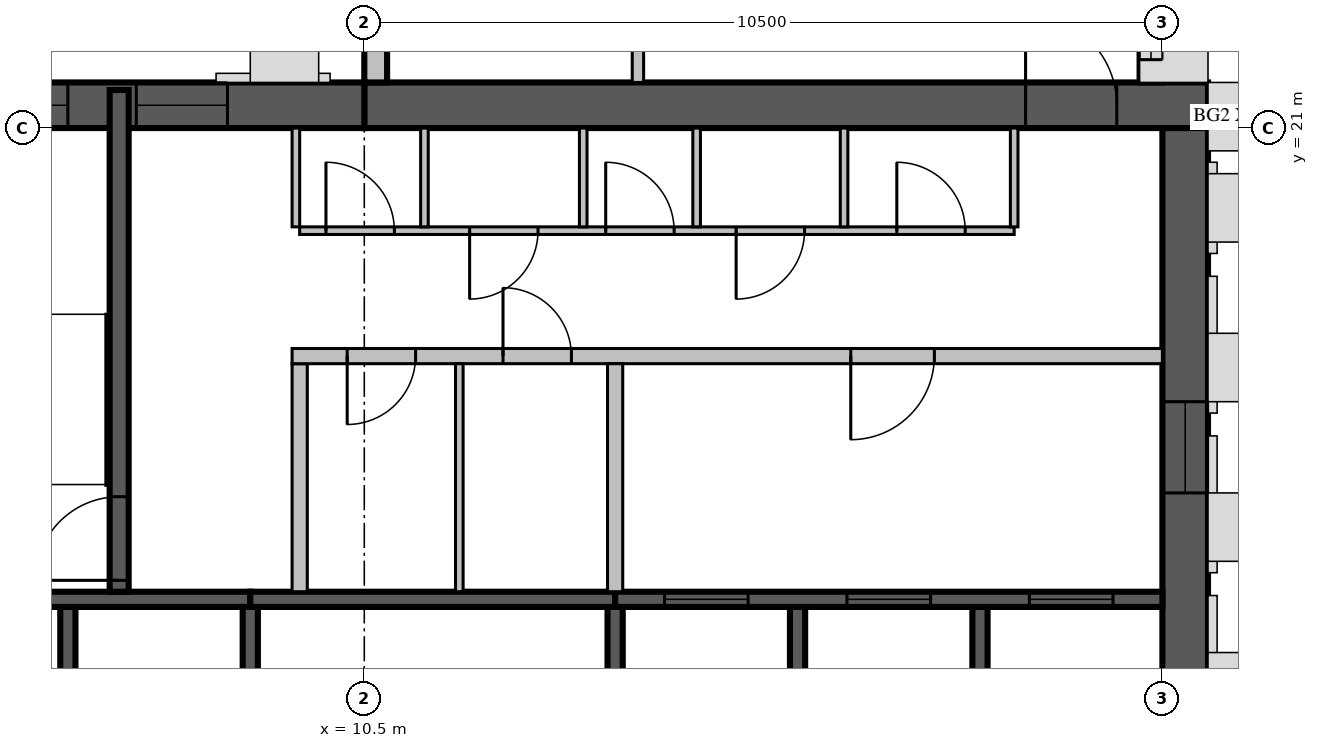
"""IFC4 building model, lengths in metres.
Left out: names, types, materials, properties, quantities, classifications, styles, units other than length and angle.
Written with IfcOpenShell. Run it as: python <this file> out.ifc"""

import sys

from ifc_helpers import new_model, si_unit, direction, frame, frame_2d, origin, place, context, subcontext, project, spatial, rectangle, extrude, source, transform, mapped, element, fill, save


model = new_model("IFC4")
c1 = context("Model", 3, precision=1e-05, world=origin(), true_north=direction((0.0, 1.0)))
c2 = subcontext(c1, "Body", "Model", "MODEL_VIEW")
j1 = project(units=[si_unit("LENGTHUNIT", "METRE"), si_unit("PLANEANGLEUNIT", "RADIAN")], contexts=[c1])
p1 = place(None, origin())
s1 = spatial("IfcSite", under=j1, at=p1, CompositionType="ELEMENT")
p2 = place(p1, origin())
s2 = spatial("IfcBuilding", under=s1, at=p2, CompositionType="ELEMENT")
p3 = place(p2, frame((0.0, 0.0, 305.5)))
s3 = spatial("IfcBuildingStorey", under=s2, at=p3, CompositionType="ELEMENT", Elevation=305.5)
m1 = source(origin(), c2, "Body", "SweptSolid", [
    extrude(rectangle(XDim=11.1, YDim=0.6, at=frame_2d((5.55, 0.0))), origin(), (0.0, 0.0, 1.0), 3.5),
])
p4 = place(p3, frame((10.5, 21.3, 0.0), z_axis=(0.0, 0.0, 1.0), x_axis=(1.0, 0.0, 0.0)))
e1 = element("IfcWall", 1, at=p4, inside=s3, PredefinedType="SHEAR", context=c2, shape_type="MappedRepresentation", body=[
    mapped(m1, transform((0.0, 0.0, 0.0), scale=1.0)),
])
m2 = source(origin(), c2, "Body", "SweptSolid", [
    extrude(rectangle(XDim=1.2, YDim=2.1, at=frame_2d((0.6, 1.05))), frame((0.0, 0.31, 0.0), z_axis=(0.0, -1.0, 0.0), x_axis=(1.0, 0.0, 0.0)), (0.0, 0.0, 1.0), 0.62),
])
p5 = place(p4, frame((8.7, 0.0, 0.0)))
e2 = element("IfcOpeningElement", 2, at=p5, cuts=e1, PredefinedType="OPENING", context=c2, shape_type="MappedRepresentation", body=[
    mapped(m2, transform((0.0, 0.0, 0.0), scale=1.0)),
])
m3 = source(origin(), c2, "Body", "SweptSolid", [
    extrude(rectangle(XDim=10.5, YDim=0.6, at=frame_2d((5.25, 0.0))), origin(), (0.0, 0.0, 1.0), 3.5),
])
p6 = place(p3, frame((21.3, 10.5, 0.0), z_axis=(0.0, 0.0, 1.0), x_axis=(0.0, 1.0, 0.0)))
e3 = element("IfcWall", 3, at=p6, inside=s3, PredefinedType="SHEAR", context=c2, shape_type="MappedRepresentation", body=[
    mapped(m3, transform((0.0, 0.0, 0.0), scale=1.0)),
])
m4 = source(origin(), c2, "Body", "SweptSolid", [
    extrude(rectangle(XDim=1.2, YDim=2.4, at=frame_2d((0.6, 1.2))), frame((0.0, 0.31, 0.0), z_axis=(0.0, -1.0, 0.0), x_axis=(1.0, 0.0, 0.0)), (0.0, 0.0, 1.0), 0.62),
])
p7 = place(p6, frame((5.7, 0.0, 0.6)))
e4 = element("IfcOpeningElement", 4, at=p7, cuts=e3, PredefinedType="OPENING", context=c2, shape_type="MappedRepresentation", body=[
    mapped(m4, transform((0.0, 0.0, 0.0), scale=1.0)),
])
m5 = source(origin(), c2, "Body", "SweptSolid", [
    extrude(rectangle(XDim=6.6, YDim=0.6, at=frame_2d((3.3, 0.0))), origin(), (0.0, 0.0, 1.0), 3.5),
])
p8 = place(p3, frame((3.9, 21.3, 0.0), z_axis=(0.0, 0.0, 1.0), x_axis=(1.0, 0.0, 0.0)))
e5 = element("IfcWall", 5, at=p8, inside=s3, PredefinedType="SHEAR", context=c2, shape_type="MappedRepresentation", body=[
    mapped(m5, transform((0.0, 0.0, 0.0), scale=1.0)),
])
p9 = place(p8, frame((1.5, 0.0, 0.6)))
e6 = element("IfcOpeningElement", 6, at=p9, cuts=e5, PredefinedType="OPENING", context=c2, shape_type="MappedRepresentation", body=[
    mapped(m4, transform((0.0, 0.0, 0.0), scale=1.0)),
])
p10 = place(p8, frame((3.6, 0.0, 0.6)))
e7 = element("IfcOpeningElement", 7, at=p10, cuts=e5, PredefinedType="OPENING", context=c2, shape_type="MappedRepresentation", body=[
    mapped(m4, transform((0.0, 0.0, 0.0), scale=1.0)),
])
m6 = source(origin(), c2, "Body", "SweptSolid", [
    extrude(rectangle(XDim=7.45, YDim=0.3, at=frame_2d((3.725, 0.0))), origin(), (0.0, 0.0, 1.0), 3.1),
])
p11 = place(p3, frame((20.85, 21.6, 0.0), z_axis=(0.0, 0.0, 1.0), x_axis=(0.0, 1.0, 0.0)))
e8 = element("IfcWall", 8, at=p11, inside=s3, PredefinedType="STANDARD", context=c2, shape_type="MappedRepresentation", body=[
    mapped(m6, transform((0.0, 0.0, 0.0), scale=1.0)),
])
m7 = source(origin(), c2, "Body", "SweptSolid", [
    extrude(rectangle(XDim=2.4, YDim=2.0, at=frame_2d((1.2, 1.0))), frame((0.0, 0.16, 0.0), z_axis=(0.0, -1.0, 0.0), x_axis=(1.0, 0.0, 0.0)), (0.0, 0.0, 1.0), 0.32),
])
p12 = place(p11, frame((0.3, 0.0, 0.6)))
e9 = element("IfcOpeningElement", 9, at=p12, cuts=e8, PredefinedType="OPENING", context=c2, shape_type="MappedRepresentation", body=[
    mapped(m7, transform((0.0, 0.0, 0.0), scale=1.0)),
])
m8 = source(origin(), c2, "Body", "SweptSolid", [
    extrude(rectangle(XDim=3.0, YDim=2.0, at=frame_2d((1.5, 1.0))), frame((0.0, 0.16, 0.0), z_axis=(0.0, -1.0, 0.0), x_axis=(1.0, 0.0, 0.0)), (0.0, 0.0, 1.0), 0.32),
])
p13 = place(p11, frame((4.2, 0.0, 0.6)))
e10 = element("IfcOpeningElement", 10, at=p13, cuts=e8, PredefinedType="OPENING", context=c2, shape_type="MappedRepresentation", body=[
    mapped(m8, transform((0.0, 0.0, 0.0), scale=1.0)),
])
m9 = source(origin(), c2, "Body", "SweptSolid", [
    extrude(rectangle(XDim=5.28, YDim=0.3, at=frame_2d((2.64, 0.0))), origin(), (0.0, 0.0, 1.0), 3.1),
])
p14 = place(p3, frame((10.65, 26.88, 0.0), z_axis=(0.0, 0.0, 1.0), x_axis=(0.0, -1.0, 0.0)))
e11 = element("IfcWall", 11, at=p14, inside=s3, PredefinedType="STANDARD", context=c2, shape_type="MappedRepresentation", body=[
    mapped(m9, transform((0.0, 0.0, 0.0), scale=1.0)),
])
m10 = source(origin(), c2, "Body", "SweptSolid", [
    extrude(rectangle(XDim=3.6, YDim=2.0, at=frame_2d((1.8, 1.0))), frame((0.0, 0.16, 0.0), z_axis=(0.0, -1.0, 0.0), x_axis=(1.0, 0.0, 0.0)), (0.0, 0.0, 1.0), 0.32),
])
p15 = place(p14, frame((1.14, 0.0, 0.6)))
e12 = element("IfcOpeningElement", 12, at=p15, cuts=e11, PredefinedType="OPENING", context=c2, shape_type="MappedRepresentation", body=[
    mapped(m10, transform((0.0, 0.0, 0.0), scale=1.0)),
])
m11 = source(origin(), c2, "Body", "SweptSolid", [
    extrude(rectangle(XDim=3.0, YDim=0.2, at=frame_2d((1.5, 0.0))), origin(), (0.0, 0.0, 1.0), 3.5),
])
p16 = place(p3, frame((6.6, 11.7, 0.0), z_axis=(0.0, 0.0, 1.0), x_axis=(0.0, 1.0, 0.0)))
e13 = element("IfcWall", 13, at=p16, inside=s3, PredefinedType="SOLIDWALL", context=c2, shape_type="MappedRepresentation", body=[
    mapped(m11, transform((0.0, 0.0, 0.0), scale=1.0)),
])
m12 = source(origin(), c2, "Body", "SweptSolid", [
    extrude(rectangle(XDim=3.0, YDim=0.2, at=frame_2d((1.5, 0.0))), origin(), (0.0, 0.0, 1.0), 3.1),
])
for number, where, z_axis, x_axis in (
    (14, (9.0, 11.7, 0.0), (0.0, 0.0, 1.0), (0.0, 1.0, 0.0)),
    (15, (13.8, 11.7, 0.0), (0.0, 0.0, 1.0), (0.0, 1.0, 0.0)),
):
    element("IfcWall", number, at=place(p3, frame(where, z_axis=z_axis, x_axis=x_axis)), inside=s3, PredefinedType="SOLIDWALL", context=c2, shape_type="MappedRepresentation", body=[
        mapped(m12, transform((0.0, 0.0, 0.0), scale=1.0)),
    ])
for number, where, z_axis, x_axis in (
    (16, (16.2, 11.7, 0.0), (0.0, 0.0, 1.0), (0.0, 1.0, 0.0)),
    (17, (18.6, 11.7, 0.0), (0.0, 0.0, 1.0), (0.0, 1.0, 0.0)),
):
    element("IfcWall", number, at=place(p3, frame(where, z_axis=z_axis, x_axis=x_axis)), inside=s3, PredefinedType="SOLIDWALL", context=c2, shape_type="MappedRepresentation", body=[
        mapped(m11, transform((0.0, 0.0, 0.0), scale=1.0)),
    ])
m13 = source(origin(), c2, "Body", "SweptSolid", [
    extrude(rectangle(XDim=4.8, YDim=0.2, at=frame_2d((2.4, 0.0))), origin(), (0.0, 0.0, 1.0), 3.5),
])
p17 = place(p3, frame((4.2, 14.8, 0.0), z_axis=(0.0, 0.0, 1.0), x_axis=(1.0, 0.0, 0.0)))
e18 = element("IfcWall", 18, at=p17, inside=s3, PredefinedType="SOLIDWALL", context=c2, shape_type="MappedRepresentation", body=[
    mapped(m13, transform((0.0, 0.0, 0.0), scale=1.0)),
])
m14 = source(origin(), c2, "Body", "SweptSolid", [
    extrude(rectangle(XDim=4.8, YDim=0.2, at=frame_2d((2.4, 0.0))), origin(), (0.0, 0.0, 1.0), 3.1),
])
p18 = place(p3, frame((9.0, 14.8, 0.0), z_axis=(0.0, 0.0, 1.0), x_axis=(1.0, 0.0, 0.0)))
e19 = element("IfcWall", 19, at=p18, inside=s3, PredefinedType="SOLIDWALL", context=c2, shape_type="MappedRepresentation", body=[
    mapped(m14, transform((0.0, 0.0, 0.0), scale=1.0)),
])
m15 = source(origin(), c2, "Body", "SweptSolid", [
    extrude(rectangle(XDim=7.2, YDim=0.2, at=frame_2d((3.6, 0.0))), origin(), (0.0, 0.0, 1.0), 3.5),
])
p19 = place(p3, frame((13.8, 14.8, 0.0), z_axis=(0.0, 0.0, 1.0), x_axis=(1.0, 0.0, 0.0)))
e20 = element("IfcWall", 20, at=p19, inside=s3, PredefinedType="SOLIDWALL", context=c2, shape_type="MappedRepresentation", body=[
    mapped(m15, transform((0.0, 0.0, 0.0), scale=1.0)),
])
m16 = source(origin(), c2, "Body", "SweptSolid", [
    extrude(rectangle(XDim=1.1, YDim=2.1, at=frame_2d((0.55, 1.05))), frame((0.0, 0.11, 0.0), z_axis=(0.0, -1.0, 0.0), x_axis=(1.0, 0.0, 0.0)), (0.0, 0.0, 1.0), 0.22),
])
p20 = place(p19, frame((0.65, 0.0, 0.0)))
e21 = element("IfcOpeningElement", 21, at=p20, cuts=e20, PredefinedType="OPENING", context=c2, shape_type="MappedRepresentation", body=[
    mapped(m16, transform((0.0, 0.0, 0.0), scale=1.0)),
])
p21 = place(p19, frame((3.05, 0.0, 0.0)))
e22 = element("IfcOpeningElement", 22, at=p21, cuts=e20, PredefinedType="OPENING", context=c2, shape_type="MappedRepresentation", body=[
    mapped(m16, transform((0.0, 0.0, 0.0), scale=1.0)),
])
p22 = place(p19, frame((5.45, 0.0, 0.0)))
e23 = element("IfcOpeningElement", 23, at=p22, cuts=e20, PredefinedType="OPENING", context=c2, shape_type="MappedRepresentation", body=[
    mapped(m16, transform((0.0, 0.0, 0.0), scale=1.0)),
])
m17 = source(origin(), c2, "Body", "SweptSolid", [
    extrude(rectangle(XDim=6.6, YDim=0.25, at=frame_2d((3.3, 0.0))), origin(), (0.0, 0.0, 1.0), 3.1),
])
p23 = place(p3, frame((7.275, 14.9, 0.0), z_axis=(0.0, 0.0, 1.0), x_axis=(0.0, 1.0, 0.0)))
e24 = element("IfcWall", 24, at=p23, inside=s3, PredefinedType="SOLIDWALL", context=c2, shape_type="MappedRepresentation", body=[
    mapped(m17, transform((0.0, 0.0, 0.0), scale=1.0)),
])
m18 = source(origin(), c2, "Body", "SweptSolid", [
    extrude(rectangle(XDim=1.1, YDim=2.1, at=frame_2d((0.55, 1.05))), frame((0.0, 0.135, 0.0), z_axis=(0.0, -1.0, 0.0), x_axis=(1.0, 0.0, 0.0)), (0.0, 0.0, 1.0), 0.27),
])
p24 = place(p23, frame((0.15, 0.0, 0.0)))
e25 = element("IfcOpeningElement", 25, at=p24, cuts=e24, PredefinedType="OPENING", context=c2, shape_type="MappedRepresentation", body=[
    mapped(m18, transform((0.0, 0.0, 0.0), scale=1.0)),
])
m19 = source(origin(), c2, "Body", "SweptSolid", [
    extrude(rectangle(XDim=3.0, YDim=0.2, at=frame_2d((1.5, 0.0))), origin(), (0.0, 0.0, 1.0), 3.1),
])
p25 = place(p3, frame((9.65, 14.9, 0.0), z_axis=(0.0, 0.0, 1.0), x_axis=(0.0, 1.0, 0.0)))
e26 = element("IfcWall", 26, at=p25, inside=s3, PredefinedType="PARTITIONING", context=c2, shape_type="MappedRepresentation", body=[
    mapped(m19, transform((0.0, 0.0, 0.0), scale=1.0)),
])
m20 = source(origin(), c2, "Body", "SweptSolid", [
    extrude(rectangle(XDim=11.45, YDim=0.2, at=frame_2d((5.725, 0.0))), origin(), (0.0, 0.0, 1.0), 3.1),
])
p26 = place(p3, frame((9.55, 18.0, 0.0), z_axis=(0.0, 0.0, 1.0), x_axis=(1.0, 0.0, 0.0)))
e27 = element("IfcWall", 27, at=p26, inside=s3, PredefinedType="PARTITIONING", context=c2, shape_type="MappedRepresentation", body=[
    mapped(m20, transform((0.0, 0.0, 0.0), scale=1.0)),
])
m21 = source(origin(), c2, "Body", "SweptSolid", [
    extrude(rectangle(XDim=0.9, YDim=2.1, at=frame_2d((0.45, 1.05))), frame((0.0, 0.11, 0.0), z_axis=(0.0, -1.0, 0.0), x_axis=(1.0, 0.0, 0.0)), (0.0, 0.0, 1.0), 0.22),
])
p27 = place(p26, frame((0.725, 0.0, 0.0)))
e28 = element("IfcOpeningElement", 28, at=p27, cuts=e27, PredefinedType="OPENING", context=c2, shape_type="MappedRepresentation", body=[
    mapped(m21, transform((0.0, 0.0, 0.0), scale=1.0)),
])
p28 = place(p26, frame((2.775, 0.0, 0.0)))
e29 = element("IfcOpeningElement", 29, at=p28, cuts=e27, PredefinedType="OPENING", context=c2, shape_type="MappedRepresentation", body=[
    mapped(m21, transform((0.0, 0.0, 0.0), scale=1.0)),
])
p29 = place(p26, frame((7.35, 0.0, 0.0)))
e30 = element("IfcOpeningElement", 30, at=p29, cuts=e27, PredefinedType="OPENING", context=c2, shape_type="MappedRepresentation", body=[
    mapped(m16, transform((0.0, 0.0, 0.0), scale=1.0)),
])
m22 = source(origin(), c2, "Body", "SweptSolid", [
    extrude(rectangle(XDim=9.4, YDim=0.1, at=frame_2d((4.7, 0.0))), origin(), (0.0, 0.0, 1.0), 3.1),
])
p30 = place(p3, frame((9.65, 19.65, 0.0), z_axis=(0.0, 0.0, 1.0), x_axis=(1.0, 0.0, 0.0)))
e31 = element("IfcWall", 31, at=p30, inside=s3, PredefinedType="PARTITIONING", context=c2, shape_type="MappedRepresentation", body=[
    mapped(m22, transform((0.0, 0.0, 0.0), scale=1.0)),
])
m23 = source(origin(), c2, "Body", "SweptSolid", [
    extrude(rectangle(XDim=0.9, YDim=2.1, at=frame_2d((0.45, 1.05))), frame((0.0, 0.06, 0.0), z_axis=(0.0, -1.0, 0.0), x_axis=(1.0, 0.0, 0.0)), (0.0, 0.0, 1.0), 0.12),
])
p31 = place(p30, frame((0.346, 0.0, 0.0)))
e32 = element("IfcOpeningElement", 32, at=p31, cuts=e31, PredefinedType="OPENING", context=c2, shape_type="MappedRepresentation", body=[
    mapped(m23, transform((0.0, 0.0, 0.0), scale=1.0)),
])
p32 = place(p30, frame((2.236, 0.0, 0.0)))
e33 = element("IfcOpeningElement", 33, at=p32, cuts=e31, PredefinedType="OPENING", context=c2, shape_type="MappedRepresentation", body=[
    mapped(m23, transform((0.0, 0.0, 0.0), scale=1.0)),
])
p33 = place(p30, frame((4.026, 0.0, 0.0)))
e34 = element("IfcOpeningElement", 34, at=p33, cuts=e31, PredefinedType="OPENING", context=c2, shape_type="MappedRepresentation", body=[
    mapped(m23, transform((0.0, 0.0, 0.0), scale=1.0)),
])
p34 = place(p30, frame((5.742, 0.0, 0.0)))
e35 = element("IfcOpeningElement", 35, at=p34, cuts=e31, PredefinedType="OPENING", context=c2, shape_type="MappedRepresentation", body=[
    mapped(m23, transform((0.0, 0.0, 0.0), scale=1.0)),
])
p35 = place(p30, frame((7.856, 0.0, 0.0)))
e36 = element("IfcOpeningElement", 36, at=p35, cuts=e31, PredefinedType="OPENING", context=c2, shape_type="MappedRepresentation", body=[
    mapped(m23, transform((0.0, 0.0, 0.0), scale=1.0)),
])
m24 = source(origin(), c2, "Body", "SweptSolid", [
    extrude(rectangle(XDim=1.3, YDim=0.1, at=frame_2d((0.65, 0.0))), origin(), (0.0, 0.0, 1.0), 3.1),
])
for number, where, z_axis, x_axis in (
    (37, (11.291, 19.7, 0.0), (0.0, 0.0, 1.0), (0.0, 1.0, 0.0)),
    (38, (13.38, 19.7, 0.0), (0.0, 0.0, 1.0), (0.0, 1.0, 0.0)),
    (39, (14.872, 19.7, 0.0), (0.0, 0.0, 1.0), (0.0, 1.0, 0.0)),
    (40, (16.812, 19.7, 0.0), (0.0, 0.0, 1.0), (0.0, 1.0, 0.0)),
    (41, (9.6, 19.7, 0.0), (0.0, 0.0, 1.0), (0.0, 1.0, 0.0)),
    (42, (19.05, 19.7, 0.0), (0.0, 0.0, 1.0), (0.0, 1.0, 0.0)),
):
    element("IfcWall", number, at=place(p3, frame(where, z_axis=z_axis, x_axis=x_axis)), inside=s3, PredefinedType="PARTITIONING", context=c2, shape_type="MappedRepresentation", body=[
        mapped(m24, transform((0.0, 0.0, 0.0), scale=1.0)),
    ])
p36 = place(p3, frame((13.8, 14.9, 0.0), z_axis=(0.0, 0.0, 1.0), x_axis=(0.0, 1.0, 0.0)))
e43 = element("IfcWall", 43, at=p36, inside=s3, PredefinedType="PARTITIONING", context=c2, shape_type="MappedRepresentation", body=[
    mapped(m19, transform((0.0, 0.0, 0.0), scale=1.0)),
])
m25 = source(origin(), c2, "Body", "SweptSolid", [
    extrude(rectangle(XDim=3.0, YDim=0.1, at=frame_2d((1.5, 0.0))), origin(), (0.0, 0.0, 1.0), 3.1),
])
p37 = place(p3, frame((11.75, 14.9, 0.0), z_axis=(0.0, 0.0, 1.0), x_axis=(0.0, 1.0, 0.0)))
e44 = element("IfcWall", 44, at=p37, inside=s3, PredefinedType="PARTITIONING", context=c2, shape_type="MappedRepresentation", body=[
    mapped(m25, transform((0.0, 0.0, 0.0), scale=1.0)),
])
m26 = source(origin(), c2, "Body", "SweptSolid", [
    extrude(rectangle(XDim=7.725, YDim=0.15, at=frame_2d((3.862, 0.0))), origin(), (0.0, 0.0, 1.0), 3.1),
])
p38 = place(p3, frame((14.1, 29.325, 0.0), z_axis=(0.0, 0.0, 1.0), x_axis=(0.0, -1.0, 0.0)))
e45 = element("IfcWall", 45, at=p38, inside=s3, PredefinedType="PARTITIONING", context=c2, shape_type="MappedRepresentation", body=[
    mapped(m26, transform((0.0, 0.0, 0.0), scale=1.0)),
])
m27 = source(origin(), c2, "Body", "SweptSolid", [
    extrude(rectangle(XDim=1.0, YDim=2.1, at=frame_2d((0.5, 1.05))), frame((0.0, 0.085, 0.0), z_axis=(0.0, -1.0, 0.0), x_axis=(1.0, 0.0, 0.0)), (0.0, 0.0, 1.0), 0.17),
])
p39 = place(p38, frame((6.275, 0.0, 0.0)))
e46 = element("IfcOpeningElement", 46, at=p39, cuts=e45, PredefinedType="OPENING", context=c2, shape_type="MappedRepresentation", body=[
    mapped(m27, transform((0.0, 0.0, 0.0), scale=1.0)),
])
m28 = source(origin(), c2, "Body", "SweptSolid", [
    extrude(rectangle(XDim=2.4, YDim=2.0, at=frame_2d((1.2, 1.0))), frame((0.0, 0.03, 0.0), z_axis=(0.0, -1.0, 0.0), x_axis=(1.0, 0.0, 0.0)), (0.0, 0.0, 1.0), 0.06),
])
p40 = place(p12, origin())
e47 = element("IfcWindow", 47, at=p40, inside=s3, PartitioningType="SINGLE_PANEL", PredefinedType="WINDOW", context=c2, shape_type="MappedRepresentation", body=[
    mapped(m28, transform((0.0, 0.0, 0.0), scale=1.0)),
])
fill(e9, e47)
m29 = source(origin(), c2, "Body", "SweptSolid", [
    extrude(rectangle(XDim=1.1, YDim=2.1, at=frame_2d((0.55, 1.05))), frame((0.0, 0.025, 0.0), z_axis=(0.0, -1.0, 0.0), x_axis=(1.0, 0.0, 0.0)), (0.0, 0.0, 1.0), 0.05),
])
p41 = place(p20, origin())
e48 = element("IfcDoor", 48, at=p41, inside=s3, OperationType="SLIDING_TO_LEFT", PredefinedType="DOOR", context=c2, shape_type="MappedRepresentation", body=[
    mapped(m29, transform((0.0, 0.0, 0.0), scale=1.0)),
])
fill(e21, e48)
p42 = place(p21, origin())
e49 = element("IfcDoor", 49, at=p42, inside=s3, OperationType="SLIDING_TO_LEFT", PredefinedType="DOOR", context=c2, shape_type="MappedRepresentation", body=[
    mapped(m29, transform((0.0, 0.0, 0.0), scale=1.0)),
])
fill(e22, e49)
p43 = place(p22, origin())
e50 = element("IfcDoor", 50, at=p43, inside=s3, OperationType="SLIDING_TO_LEFT", PredefinedType="DOOR", context=c2, shape_type="MappedRepresentation", body=[
    mapped(m29, transform((0.0, 0.0, 0.0), scale=1.0)),
])
fill(e23, e50)
p44 = place(p24, origin())
e51 = element("IfcDoor", 51, at=p44, inside=s3, OperationType="SINGLE_SWING_LEFT", PredefinedType="DOOR", context=c2, shape_type="MappedRepresentation", body=[
    mapped(m29, transform((0.0, 0.0, 0.0), scale=1.0)),
])
fill(e25, e51)
m30 = source(origin(), c2, "Body", "SweptSolid", [
    extrude(rectangle(XDim=0.9, YDim=2.1, at=frame_2d((0.45, 1.05))), frame((0.0, 0.025, 0.0), z_axis=(0.0, -1.0, 0.0), x_axis=(1.0, 0.0, 0.0)), (0.0, 0.0, 1.0), 0.05),
])
p45 = place(p27, origin())
e52 = element("IfcDoor", 52, at=p45, inside=s3, OperationType="SINGLE_SWING_RIGHT", PredefinedType="DOOR", context=c2, shape_type="MappedRepresentation", body=[
    mapped(m30, transform((0.0, 0.0, 0.0), scale=1.0)),
])
fill(e28, e52)
p46 = place(p28, origin())
e53 = element("IfcDoor", 53, at=p46, inside=s3, OperationType="SINGLE_SWING_LEFT", PredefinedType="DOOR", context=c2, shape_type="MappedRepresentation", body=[
    mapped(m30, transform((0.0, 0.0, 0.0), scale=1.0)),
])
fill(e29, e53)
p47 = place(p29, origin())
e54 = element("IfcDoor", 54, at=p47, inside=s3, OperationType="SINGLE_SWING_RIGHT", PredefinedType="DOOR", context=c2, shape_type="MappedRepresentation", body=[
    mapped(m29, transform((0.0, 0.0, 0.0), scale=1.0)),
])
fill(e30, e54)
p48 = place(p31, origin())
e55 = element("IfcDoor", 55, at=p48, inside=s3, OperationType="SINGLE_SWING_LEFT", PredefinedType="DOOR", context=c2, shape_type="MappedRepresentation", body=[
    mapped(m30, transform((0.0, 0.0, 0.0), scale=1.0)),
])
fill(e32, e55)
p49 = place(p32, origin())
e56 = element("IfcDoor", 56, at=p49, inside=s3, OperationType="SINGLE_SWING_RIGHT", PredefinedType="DOOR", context=c2, shape_type="MappedRepresentation", body=[
    mapped(m30, transform((0.0, 0.0, 0.0), scale=1.0)),
])
fill(e33, e56)
p50 = place(p33, origin())
e57 = element("IfcDoor", 57, at=p50, inside=s3, OperationType="SINGLE_SWING_LEFT", PredefinedType="DOOR", context=c2, shape_type="MappedRepresentation", body=[
    mapped(m30, transform((0.0, 0.0, 0.0), scale=1.0)),
])
fill(e34, e57)
p51 = place(p34, origin())
e58 = element("IfcDoor", 58, at=p51, inside=s3, OperationType="SINGLE_SWING_RIGHT", PredefinedType="DOOR", context=c2, shape_type="MappedRepresentation", body=[
    mapped(m30, transform((0.0, 0.0, 0.0), scale=1.0)),
])
fill(e35, e58)
p52 = place(p35, origin())
e59 = element("IfcDoor", 59, at=p52, inside=s3, OperationType="SINGLE_SWING_LEFT", PredefinedType="DOOR", context=c2, shape_type="MappedRepresentation", body=[
    mapped(m30, transform((0.0, 0.0, 0.0), scale=1.0)),
])
fill(e36, e59)
m31 = source(origin(), c2, "Body", "SweptSolid", [
    extrude(rectangle(XDim=1.2, YDim=2.1, at=frame_2d((0.6, 1.05))), frame((0.0, 0.025, 0.0), z_axis=(0.0, -1.0, 0.0), x_axis=(1.0, 0.0, 0.0)), (0.0, 0.0, 1.0), 0.05),
])
p53 = place(p5, origin())
e60 = element("IfcDoor", 60, at=p53, inside=s3, OperationType="SINGLE_SWING_LEFT", PredefinedType="DOOR", context=c2, shape_type="MappedRepresentation", body=[
    mapped(m31, transform((0.0, 0.0, 0.0), scale=1.0)),
])
fill(e2, e60)
m32 = source(origin(), c2, "Body", "SweptSolid", [
    extrude(rectangle(XDim=1.2, YDim=2.4, at=frame_2d((0.6, 1.2))), frame((0.0, 0.03, 0.0), z_axis=(0.0, -1.0, 0.0), x_axis=(1.0, 0.0, 0.0)), (0.0, 0.0, 1.0), 0.06),
])
p54 = place(p7, origin())
e61 = element("IfcWindow", 61, at=p54, inside=s3, PartitioningType="SINGLE_PANEL", PredefinedType="WINDOW", context=c2, shape_type="MappedRepresentation", body=[
    mapped(m32, transform((0.0, 0.0, 0.0), scale=1.0)),
])
fill(e4, e61)
p55 = place(p9, origin())
e62 = element("IfcWindow", 62, at=p55, inside=s3, PartitioningType="SINGLE_PANEL", PredefinedType="WINDOW", context=c2, shape_type="MappedRepresentation", body=[
    mapped(m32, transform((0.0, 0.0, 0.0), scale=1.0)),
])
fill(e6, e62)
p56 = place(p10, origin())
e63 = element("IfcWindow", 63, at=p56, inside=s3, PartitioningType="SINGLE_PANEL", PredefinedType="WINDOW", context=c2, shape_type="MappedRepresentation", body=[
    mapped(m32, transform((0.0, 0.0, 0.0), scale=1.0)),
])
fill(e7, e63)
save(model, sys.argv[1])
